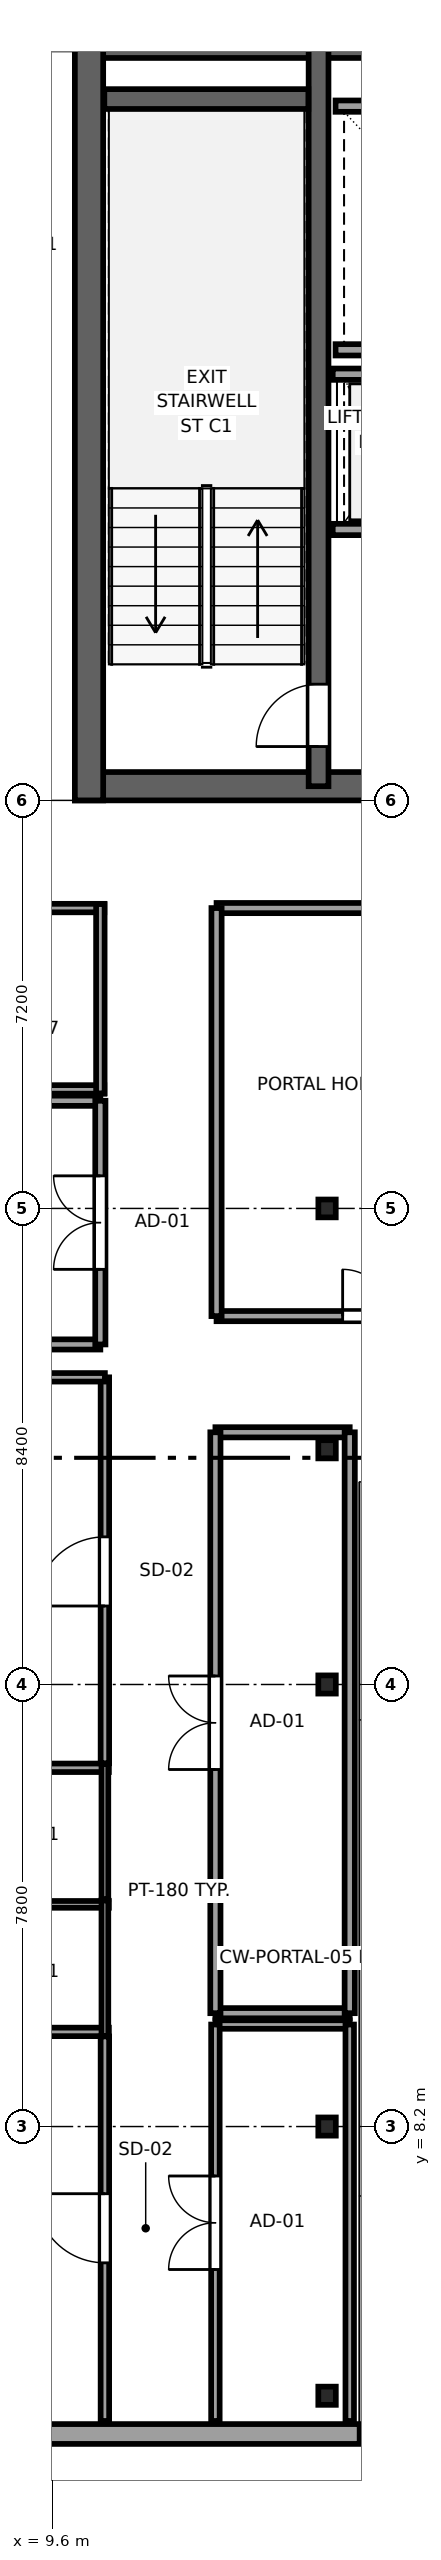
"""IFC4 building model, lengths in metres.
Left out: names, types, materials, properties, quantities, classifications, styles, units other than length and angle.
Written with IfcOpenShell. Run it as: python <this file> out.ifc"""

import sys

from ifc_helpers import new_model, si_unit, direction, frame, frame_2d, origin, origin_2d, place, context, subcontext, project, spatial, rectangle, i_section, extrude, source, transform, mapped, element, fill, save


model = new_model("IFC4")
c1 = context("Model", 3, precision=1e-05, world=origin(), true_north=direction((0.0, 1.0)))
c2 = subcontext(c1, "Body", "Model", "MODEL_VIEW")
j1 = project(units=[si_unit("LENGTHUNIT", "METRE"), si_unit("PLANEANGLEUNIT", "RADIAN")], contexts=[c1])
p1 = place(None, origin())
s1 = spatial("IfcSite", under=j1, at=p1, CompositionType="ELEMENT")
p2 = place(p1, origin())
s2 = spatial("IfcBuilding", under=s1, at=p2, CompositionType="ELEMENT")
p3 = place(p2, frame((0.0, 0.0, 252.3)))
s3 = spatial("IfcBuildingStorey", under=s2, at=p3, CompositionType="ELEMENT", Elevation=252.3)
p4 = place(p3, frame((10.0, 31.85, 0.0), z_axis=(0.0, 0.0, 1.0), x_axis=(1.0, 0.0, 0.0)))
e1 = element("IfcWall", 1, at=p4, inside=s3, PredefinedType="SHEAR", context=c2, shape_type="SweptSolid", body=[
    extrude(rectangle(XDim=26.0, YDim=0.5, at=frame_2d((13.0, 0.0))), origin(), (0.0, 0.0, 1.0), 3.55),
])
p5 = place(p4, frame((7.45, 0.0, 0.0), z_axis=(0.0, 0.0, 1.0), x_axis=(-1.0, 0.0, 0.0)))
e2 = element("IfcOpeningElement", 2, at=p5, cuts=e1, PredefinedType="OPENING", context=c2, shape_type="SweptSolid", body=[
    extrude(rectangle(XDim=1.5, YDim=2.04, at=frame_2d((0.75, 1.02))), frame((0.0, 0.26, 0.0), z_axis=(0.0, -1.0, 0.0), x_axis=(1.0, 0.0, 0.0)), (0.0, 0.0, 1.0), 0.52),
])
p6 = place(p4, frame((13.75, 0.0, 0.0), z_axis=(0.0, 0.0, 1.0), x_axis=(-1.0, 0.0, 0.0)))
e3 = element("IfcOpeningElement", 3, at=p6, cuts=e1, PredefinedType="OPENING", context=c2, shape_type="SweptSolid", body=[
    extrude(rectangle(XDim=1.5, YDim=2.04, at=frame_2d((0.75, 1.02))), frame((0.0, 0.26, 0.0), z_axis=(0.0, -1.0, 0.0), x_axis=(1.0, 0.0, 0.0)), (0.0, 0.0, 1.0), 0.52),
])
p7 = place(p4, frame((20.05, 0.0, 0.0), z_axis=(0.0, 0.0, 1.0), x_axis=(-1.0, 0.0, 0.0)))
e4 = element("IfcOpeningElement", 4, at=p7, cuts=e1, PredefinedType="OPENING", context=c2, shape_type="SweptSolid", body=[
    extrude(rectangle(XDim=1.5, YDim=2.04, at=frame_2d((0.75, 1.02))), frame((0.0, 0.26, 0.0), z_axis=(0.0, -1.0, 0.0), x_axis=(1.0, 0.0, 0.0)), (0.0, 0.0, 1.0), 0.52),
])
p8 = place(p3, frame((10.0, 44.95, 0.0), z_axis=(0.0, 0.0, 1.0), x_axis=(1.0, 0.0, 0.0)))
e5 = element("IfcWall", 5, at=p8, inside=s3, PredefinedType="SHEAR", context=c2, shape_type="SweptSolid", body=[
    extrude(rectangle(XDim=26.0, YDim=0.5, at=frame_2d((13.0, 0.0))), origin(), (0.0, 0.0, 1.0), 3.55),
])
p9 = place(p3, frame((10.25, 31.6, 0.0), z_axis=(0.0, 0.0, 1.0), x_axis=(0.0, 1.0, 0.0)))
e6 = element("IfcWall", 6, at=p9, inside=s3, PredefinedType="SHEAR", context=c2, shape_type="SweptSolid", body=[
    extrude(rectangle(XDim=13.6, YDim=0.5, at=frame_2d((6.8, 0.0))), origin(), (0.0, 0.0, 1.0), 3.55),
])
p10 = place(p3, frame((14.3, 31.85, 0.0), z_axis=(0.0, 0.0, 1.0), x_axis=(0.0, 1.0, 0.0)))
e7 = element("IfcWall", 7, at=p10, inside=s3, PredefinedType="SHEAR", context=c2, shape_type="SweptSolid", body=[
    extrude(rectangle(XDim=13.1, YDim=0.35, at=frame_2d((6.55, 0.0))), origin(), (0.0, 0.0, 1.0), 3.55),
])
p11 = place(p10, frame((0.7, 0.0, 0.0)))
e8 = element("IfcOpeningElement", 8, at=p11, cuts=e7, PredefinedType="OPENING", context=c2, shape_type="SweptSolid", body=[
    extrude(rectangle(XDim=1.1, YDim=2.12, at=frame_2d((0.55, 1.06))), frame((0.0, 0.185, 0.0), z_axis=(0.0, -1.0, 0.0), x_axis=(1.0, 0.0, 0.0)), (0.0, 0.0, 1.0), 0.37),
])
p12 = place(p3, frame((10.52, 43.975, 0.0), z_axis=(0.0, 0.0, 1.0), x_axis=(1.0, 0.0, 0.0)))
e9 = element("IfcWall", 9, at=p12, inside=s3, PredefinedType="SHEAR", context=c2, shape_type="SweptSolid", body=[
    extrude(rectangle(XDim=3.6, YDim=0.35, at=frame_2d((1.8, 0.0))), origin(), (0.0, 0.0, 1.0), 3.55),
])
m1 = source(origin(), c2, "Body", "SweptSolid", [
    extrude(i_section(OverallWidth=0.309, OverallDepth=0.321, WebThickness=0.014, FlangeThickness=0.022, FilletRadius=0.017, at=origin_2d()), origin(), (0.0, 0.0, 1.0), 3.55),
])
for number, where, z_axis, x_axis in (
    (10, (14.45, 3.45, 0.0), (0.0, 0.0, 1.0), (1.0, 0.0, 0.0)),
    (11, (14.45, 8.2, 0.0), (0.0, 0.0, 1.0), (1.0, 0.0, 0.0)),
    (12, (14.45, 16.0, 0.0), (0.0, 0.0, 1.0), (1.0, 0.0, 0.0)),
):
    element("IfcColumn", number, at=place(p3, frame(where, z_axis=z_axis, x_axis=x_axis)), inside=s3, PredefinedType="COLUMN", context=c2, shape_type="MappedRepresentation", body=[
        mapped(m1, transform((0.0, 0.0, 0.0), x_axis=(1.0, 0.0, 0.0), y_axis=(0.0, 1.0, 0.0), z_axis=(0.0, 0.0, 1.0), scale=1.0)),
    ])
m2 = source(origin(), c2, "Body", "SweptSolid", [
    extrude(i_section(OverallWidth=0.307, OverallDepth=0.315, WebThickness=0.012, FlangeThickness=0.019, FilletRadius=0.017, at=origin_2d()), origin(), (0.0, 0.0, 1.0), 3.55),
])
p13 = place(p3, frame((14.45, 24.4, 0.0), z_axis=(0.0, 0.0, 1.0), x_axis=(1.0, 0.0, 0.0)))
e13 = element("IfcColumn", 13, at=p13, inside=s3, PredefinedType="COLUMN", context=c2, shape_type="MappedRepresentation", body=[
    mapped(m2, transform((0.0, 0.0, 0.0), x_axis=(1.0, 0.0, 0.0), y_axis=(0.0, 1.0, 0.0), z_axis=(0.0, 0.0, 1.0), scale=1.0)),
])
p14 = place(p3, frame((14.45, 20.15, 0.0), z_axis=(0.0, 0.0, 1.0), x_axis=(1.0, 0.0, 0.0)))
e14 = element("IfcColumn", 14, at=p14, inside=s3, PredefinedType="COLUMN", context=c2, shape_type="MappedRepresentation", body=[
    mapped(m1, transform((0.0, 0.0, 0.0), x_axis=(1.0, 0.0, 0.0), y_axis=(0.0, 1.0, 0.0), z_axis=(0.0, 0.0, 1.0), scale=1.0)),
])
p15 = place(p3, frame((7.017, 2.775, 0.0), z_axis=(0.0, 0.0, 1.0), x_axis=(1.0, 0.0, 0.0)))
e15 = element("IfcWall", 15, at=p15, inside=s3, PredefinedType="SOLIDWALL", context=c2, shape_type="SweptSolid", body=[
    extrude(rectangle(XDim=8.008, YDim=0.35, at=frame_2d((4.004, 0.0))), origin(), (0.0, 0.0, 1.0), 3.37),
])
for number, where, z_axis, x_axis in (
    (16, (14.6, 39.55, 0.0), (0.0, 0.0, 1.0), (1.0, 0.0, 0.0)),
    (17, (14.6, 43.85, 0.0), (0.0, 0.0, 1.0), (1.0, 0.0, 0.0)),
):
    element("IfcWall", number, at=place(p3, frame(where, z_axis=z_axis, x_axis=x_axis)), inside=s3, PredefinedType="SOLIDWALL", context=c2, shape_type="SweptSolid", body=[
        extrude(rectangle(XDim=4.1, YDim=0.2, at=frame_2d((2.05, 0.0))), origin(), (0.0, 0.0, 1.0), 3.37),
    ])
p16 = place(p3, frame((14.55, 36.38, 0.0), z_axis=(0.0, 0.0, 1.0), x_axis=(1.0, 0.0, 0.0)))
e18 = element("IfcWall", 18, at=p16, inside=s3, PredefinedType="SOLIDWALL", context=c2, shape_type="SweptSolid", body=[
    extrude(rectangle(XDim=4.075, YDim=0.2, at=frame_2d((2.038, 0.0))), origin(), (0.0, 0.0, 1.0), 3.37),
])
p17 = place(p16, frame((0.55, 0.0, 0.0)))
e19 = element("IfcOpeningElement", 19, at=p17, cuts=e18, PredefinedType="OPENING", context=c2, shape_type="SweptSolid", body=[
    extrude(rectangle(XDim=1.1, YDim=2.12, at=frame_2d((0.55, 1.06))), frame((0.0, 0.11, 0.0), z_axis=(0.0, -1.0, 0.0), x_axis=(1.0, 0.0, 0.0)), (0.0, 0.0, 1.0), 0.22),
])
p18 = place(p16, frame((2.45, 0.0, 0.0)))
e20 = element("IfcOpeningElement", 20, at=p18, cuts=e18, PredefinedType="OPENING", context=c2, shape_type="SweptSolid", body=[
    extrude(rectangle(XDim=1.1, YDim=2.12, at=frame_2d((0.55, 1.06))), frame((0.0, 0.11, 0.0), z_axis=(0.0, -1.0, 0.0), x_axis=(1.0, 0.0, 0.0)), (0.0, 0.0, 1.0), 0.22),
])
p19 = place(p3, frame((14.55, 39.12, 0.0), z_axis=(0.0, 0.0, 1.0), x_axis=(1.0, 0.0, 0.0)))
e21 = element("IfcWall", 21, at=p19, inside=s3, PredefinedType="SOLIDWALL", context=c2, shape_type="SweptSolid", body=[
    extrude(rectangle(XDim=4.075, YDim=0.2, at=frame_2d((2.038, 0.0))), origin(), (0.0, 0.0, 1.0), 3.37),
])
p20 = place(p3, frame((8.01, 9.87, 0.0), z_axis=(0.0, 0.0, 1.0), x_axis=(1.0, 0.0, 0.0)))
e22 = element("IfcWall", 22, at=p20, inside=s3, PredefinedType="PARTITIONING", context=c2, shape_type="SweptSolid", body=[
    extrude(rectangle(XDim=2.59, YDim=0.15, at=frame_2d((1.295, 0.0))), origin(), (0.0, 0.0, 1.0), 3.37),
])
p21 = place(p3, frame((8.01, 12.12, 0.0), z_axis=(0.0, 0.0, 1.0), x_axis=(1.0, 0.0, 0.0)))
e23 = element("IfcWall", 23, at=p21, inside=s3, PredefinedType="PLUMBINGWALL", context=c2, shape_type="SweptSolid", body=[
    extrude(rectangle(XDim=2.59, YDim=0.12, at=frame_2d((1.295, 0.0))), origin(), (0.0, 0.0, 1.0), 3.37),
])
p22 = place(p3, frame((10.53, 9.8, 0.0), z_axis=(0.0, 0.0, 1.0), x_axis=(0.0, 1.0, 0.0)))
e24 = element("IfcWall", 24, at=p22, inside=s3, PredefinedType="PLUMBINGWALL", context=c2, shape_type="SweptSolid", body=[
    extrude(rectangle(XDim=2.39, YDim=0.12, at=frame_2d((1.195, 0.0))), origin(), (0.0, 0.0, 1.0), 3.37),
])
p23 = place(p3, frame((8.01, 14.53, 0.0), z_axis=(0.0, 0.0, 1.0), x_axis=(1.0, 0.0, 0.0)))
e25 = element("IfcWall", 25, at=p23, inside=s3, PredefinedType="PARTITIONING", context=c2, shape_type="SweptSolid", body=[
    extrude(rectangle(XDim=2.59, YDim=0.15, at=frame_2d((1.295, 0.0))), origin(), (0.0, 0.0, 1.0), 3.37),
])
p24 = place(p3, frame((10.53, 12.21, 0.0), z_axis=(0.0, 0.0, 1.0), x_axis=(0.0, 1.0, 0.0)))
e26 = element("IfcWall", 26, at=p24, inside=s3, PredefinedType="PLUMBINGWALL", context=c2, shape_type="SweptSolid", body=[
    extrude(rectangle(XDim=2.39, YDim=0.12, at=frame_2d((1.195, 0.0))), origin(), (0.0, 0.0, 1.0), 3.37),
])
p25 = place(p3, frame((10.53, 3.005, 0.0), z_axis=(0.0, 0.0, 1.0), x_axis=(0.0, 1.0, 0.0)))
e27 = element("IfcWall", 27, at=p25, inside=s3, PredefinedType="PARTITIONING", context=c2, shape_type="SweptSolid", body=[
    extrude(rectangle(XDim=6.785, YDim=0.15, at=frame_2d((3.393, 0.0))), origin(), (0.0, 0.0, 1.0), 3.37),
])
p26 = place(p25, frame((2.79, 0.0, 0.0)))
e28 = element("IfcOpeningElement", 28, at=p26, cuts=e27, PredefinedType="OPENING", context=c2, shape_type="SweptSolid", body=[
    extrude(rectangle(XDim=1.22, YDim=2.08, at=frame_2d((0.61, 1.04))), frame((0.0, 0.085, 0.0), z_axis=(0.0, -1.0, 0.0), x_axis=(1.0, 0.0, 0.0)), (0.0, 0.0, 1.0), 0.17),
])
p27 = place(p3, frame((10.53, 14.61, 0.0), z_axis=(0.0, 0.0, 1.0), x_axis=(0.0, 1.0, 0.0)))
e29 = element("IfcWall", 29, at=p27, inside=s3, PredefinedType="PARTITIONING", context=c2, shape_type="SweptSolid", body=[
    extrude(rectangle(XDim=6.81, YDim=0.15, at=frame_2d((3.405, 0.0))), origin(), (0.0, 0.0, 1.0), 3.37),
])
p28 = place(p27, frame((2.775, 0.0, 0.0)))
e30 = element("IfcOpeningElement", 30, at=p28, cuts=e29, PredefinedType="OPENING", context=c2, shape_type="SweptSolid", body=[
    extrude(rectangle(XDim=1.22, YDim=2.08, at=frame_2d((0.61, 1.04))), frame((0.0, 0.085, 0.0), z_axis=(0.0, -1.0, 0.0), x_axis=(1.0, 0.0, 0.0)), (0.0, 0.0, 1.0), 0.17),
])
p29 = place(p3, frame((3.005, 21.42, 0.0), z_axis=(0.0, 0.0, 1.0), x_axis=(1.0, 0.0, 0.0)))
e31 = element("IfcWall", 31, at=p29, inside=s3, PredefinedType="PARTITIONING", context=c2, shape_type="SweptSolid", body=[
    extrude(rectangle(XDim=7.525, YDim=0.15, at=frame_2d((3.763, 0.0))), origin(), (0.0, 0.0, 1.0), 3.37),
])
for number, where, z_axis, x_axis in (
    (32, (12.48, 10.2, 0.0), (0.0, 0.0, 1.0), (1.0, 0.0, 0.0)),
    (33, (12.48, 20.45, 0.0), (0.0, 0.0, 1.0), (1.0, 0.0, 0.0)),
):
    element("IfcWall", number, at=place(p3, frame(where, z_axis=z_axis, x_axis=x_axis)), inside=s3, PredefinedType="PARTITIONING", context=c2, shape_type="SweptSolid", body=[
        extrude(rectangle(XDim=2.37, YDim=0.18, at=frame_2d((1.185, 0.0))), origin(), (0.0, 0.0, 1.0), 3.37),
    ])
p30 = place(p3, frame((12.48, 10.2, 0.0), z_axis=(0.0, 0.0, 1.0), x_axis=(0.0, 1.0, 0.0)))
e34 = element("IfcWall", 34, at=p30, inside=s3, PredefinedType="PARTITIONING", context=c2, shape_type="SweptSolid", body=[
    extrude(rectangle(XDim=10.25, YDim=0.18, at=frame_2d((5.125, 0.0))), origin(), (0.0, 0.0, 1.0), 3.37),
])
p31 = place(p30, frame((4.3, 0.0, 0.0)))
e35 = element("IfcOpeningElement", 35, at=p31, cuts=e34, PredefinedType="OPENING", context=c2, shape_type="SweptSolid", body=[
    extrude(rectangle(XDim=1.65, YDim=2.15, at=frame_2d((0.825, 1.075))), frame((0.0, 0.1, 0.0), z_axis=(0.0, -1.0, 0.0), x_axis=(1.0, 0.0, 0.0)), (0.0, 0.0, 1.0), 0.2),
])
p32 = place(p3, frame((14.85, 10.2, 0.0), z_axis=(0.0, 0.0, 1.0), x_axis=(0.0, 1.0, 0.0)))
e36 = element("IfcWall", 36, at=p32, inside=s3, PredefinedType="PARTITIONING", context=c2, shape_type="SweptSolid", body=[
    extrude(rectangle(XDim=10.25, YDim=0.18, at=frame_2d((5.125, 0.0))), origin(), (0.0, 0.0, 1.0), 3.37),
])
p33 = place(p3, frame((12.48, 10.0, 0.0), z_axis=(0.0, 0.0, 1.0), x_axis=(1.0, 0.0, 0.0)))
e37 = element("IfcWall", 37, at=p33, inside=s3, PredefinedType="PARTITIONING", context=c2, shape_type="SweptSolid", body=[
    extrude(rectangle(XDim=2.37, YDim=0.15, at=frame_2d((1.185, 0.0))), origin(), (0.0, 0.0, 1.0), 3.37),
])
p34 = place(p3, frame((12.48, 3.005, 0.0), z_axis=(0.0, 0.0, 1.0), x_axis=(0.0, 1.0, 0.0)))
e38 = element("IfcWall", 38, at=p34, inside=s3, PredefinedType="PARTITIONING", context=c2, shape_type="SweptSolid", body=[
    extrude(rectangle(XDim=6.995, YDim=0.15, at=frame_2d((3.498, 0.0))), origin(), (0.0, 0.0, 1.0), 3.37),
])
p35 = place(p34, frame((2.673, 0.0, 0.0)))
e39 = element("IfcOpeningElement", 39, at=p35, cuts=e38, PredefinedType="OPENING", context=c2, shape_type="SweptSolid", body=[
    extrude(rectangle(XDim=1.65, YDim=2.15, at=frame_2d((0.825, 1.075))), frame((0.0, 0.085, 0.0), z_axis=(0.0, -1.0, 0.0), x_axis=(1.0, 0.0, 0.0)), (0.0, 0.0, 1.0), 0.17),
])
p36 = place(p3, frame((14.85, 3.005, 0.0), z_axis=(0.0, 0.0, 1.0), x_axis=(0.0, 1.0, 0.0)))
e40 = element("IfcWall", 40, at=p36, inside=s3, PredefinedType="PARTITIONING", context=c2, shape_type="SweptSolid", body=[
    extrude(rectangle(XDim=6.995, YDim=0.15, at=frame_2d((3.498, 0.0))), origin(), (0.0, 0.0, 1.0), 3.37),
])
p37 = place(p3, frame((12.5, 22.5, 0.0), z_axis=(0.0, 0.0, 1.0), x_axis=(1.0, 0.0, 0.0)))
e41 = element("IfcWall", 41, at=p37, inside=s3, PredefinedType="PARTITIONING", context=c2, shape_type="SweptSolid", body=[
    extrude(rectangle(XDim=6.1, YDim=0.18, at=frame_2d((3.05, 0.0))), origin(), (0.0, 0.0, 1.0), 3.37),
])
p38 = place(p37, frame((2.225, 0.0, 0.0)))
e42 = element("IfcOpeningElement", 42, at=p38, cuts=e41, PredefinedType="OPENING", context=c2, shape_type="SweptSolid", body=[
    extrude(rectangle(XDim=1.65, YDim=2.15, at=frame_2d((0.825, 1.075))), frame((0.0, 0.1, 0.0), z_axis=(0.0, -1.0, 0.0), x_axis=(1.0, 0.0, 0.0)), (0.0, 0.0, 1.0), 0.2),
])
p39 = place(p3, frame((12.5, 29.7, 0.0), z_axis=(0.0, 0.0, 1.0), x_axis=(1.0, 0.0, 0.0)))
e43 = element("IfcWall", 43, at=p39, inside=s3, PredefinedType="PARTITIONING", context=c2, shape_type="SweptSolid", body=[
    extrude(rectangle(XDim=6.1, YDim=0.18, at=frame_2d((3.05, 0.0))), origin(), (0.0, 0.0, 1.0), 3.37),
])
p40 = place(p3, frame((12.5, 22.5, 0.0), z_axis=(0.0, 0.0, 1.0), x_axis=(0.0, 1.0, 0.0)))
e44 = element("IfcWall", 44, at=p40, inside=s3, PredefinedType="PARTITIONING", context=c2, shape_type="SweptSolid", body=[
    extrude(rectangle(XDim=7.2, YDim=0.18, at=frame_2d((3.6, 0.0))), origin(), (0.0, 0.0, 1.0), 3.37),
])
for number, where, z_axis, x_axis in (
    (45, (3.005, 22.0, 0.0), (0.0, 0.0, 1.0), (1.0, 0.0, 0.0)),
    (46, (3.005, 26.3, 0.0), (0.0, 0.0, 1.0), (1.0, 0.0, 0.0)),
):
    element("IfcWall", number, at=place(p3, frame(where, z_axis=z_axis, x_axis=x_axis)), inside=s3, PredefinedType="PARTITIONING", context=c2, shape_type="SweptSolid", body=[
        extrude(rectangle(XDim=7.445, YDim=0.18, at=frame_2d((3.723, 0.0))), origin(), (0.0, 0.0, 1.0), 3.37),
    ])
p41 = place(p3, frame((10.45, 22.0, 0.0), z_axis=(0.0, 0.0, 1.0), x_axis=(0.0, 1.0, 0.0)))
e47 = element("IfcWall", 47, at=p41, inside=s3, PredefinedType="PARTITIONING", context=c2, shape_type="SweptSolid", body=[
    extrude(rectangle(XDim=4.3, YDim=0.18, at=frame_2d((2.15, 0.0))), origin(), (0.0, 0.0, 1.0), 3.37),
])
p42 = place(p41, frame((1.325, 0.0, 0.0)))
e48 = element("IfcOpeningElement", 48, at=p42, cuts=e47, PredefinedType="OPENING", context=c2, shape_type="SweptSolid", body=[
    extrude(rectangle(XDim=1.65, YDim=2.15, at=frame_2d((0.825, 1.075))), frame((0.0, 0.1, 0.0), z_axis=(0.0, -1.0, 0.0), x_axis=(1.0, 0.0, 0.0)), (0.0, 0.0, 1.0), 0.2),
])
p43 = place(p3, frame((6.13, 26.5, 0.0), z_axis=(0.0, 0.0, 1.0), x_axis=(1.0, 0.0, 0.0)))
e49 = element("IfcWall", 49, at=p43, inside=s3, PredefinedType="PARTITIONING", context=c2, shape_type="SweptSolid", body=[
    extrude(rectangle(XDim=4.39, YDim=0.15, at=frame_2d((2.195, 0.0))), origin(), (0.0, 0.0, 1.0), 3.37),
])
p44 = place(p3, frame((6.13, 29.7, 0.0), z_axis=(0.0, 0.0, 1.0), x_axis=(1.0, 0.0, 0.0)))
e50 = element("IfcWall", 50, at=p44, inside=s3, PredefinedType="PARTITIONING", context=c2, shape_type="SweptSolid", body=[
    extrude(rectangle(XDim=4.39, YDim=0.15, at=frame_2d((2.195, 0.0))), origin(), (0.0, 0.0, 1.0), 3.37),
])
p45 = place(p44, frame((1.735, 0.0, 0.0)))
e51 = element("IfcOpeningElement", 51, at=p45, cuts=e50, PredefinedType="OPENING", context=c2, shape_type="SweptSolid", body=[
    extrude(rectangle(XDim=0.92, YDim=2.01, at=frame_2d((0.46, 1.005))), frame((0.0, 0.085, 0.0), z_axis=(0.0, -1.0, 0.0), x_axis=(1.0, 0.0, 0.0)), (0.0, 0.0, 1.0), 0.17),
])
p46 = place(p3, frame((10.45, 26.43, 0.0), z_axis=(0.0, 0.0, 1.0), x_axis=(0.0, 1.0, 0.0)))
e52 = element("IfcWall", 52, at=p46, inside=s3, PredefinedType="PARTITIONING", context=c2, shape_type="SweptSolid", body=[
    extrude(rectangle(XDim=3.34, YDim=0.15, at=frame_2d((1.67, 0.0))), origin(), (0.0, 0.0, 1.0), 3.37),
])
m3 = source(origin(), c2, "Body", "SweptSolid", [
    extrude(rectangle(XDim=1.1, YDim=2.12, at=frame_2d((0.55, 1.06))), frame((0.0, 0.025, 0.0), z_axis=(0.0, -1.0, 0.0), x_axis=(1.0, 0.0, 0.0)), (0.0, 0.0, 1.0), 0.05),
])
p47 = place(p11, origin())
e53 = element("IfcDoor", 53, at=p47, inside=s3, OperationType="SINGLE_SWING_LEFT", PredefinedType="DOOR", context=c2, shape_type="MappedRepresentation", body=[
    mapped(m3, transform((0.0, 0.0, 0.0), x_axis=(1.0, 0.0, 0.0), y_axis=(0.0, 1.0, 0.0), z_axis=(0.0, 0.0, 1.0), scale=1.0)),
])
fill(e8, e53)
m4 = source(origin(), c2, "Body", "SweptSolid", [
    extrude(rectangle(XDim=1.22, YDim=2.08, at=frame_2d((0.61, 1.04))), frame((0.0, 0.025, 0.0), z_axis=(0.0, -1.0, 0.0), x_axis=(1.0, 0.0, 0.0)), (0.0, 0.0, 1.0), 0.05),
])
p48 = place(p26, origin())
e54 = element("IfcDoor", 54, at=p48, inside=s3, OperationType="SINGLE_SWING_RIGHT", PredefinedType="DOOR", context=c2, shape_type="MappedRepresentation", body=[
    mapped(m4, transform((0.0, 0.0, 0.0), x_axis=(1.0, 0.0, 0.0), y_axis=(0.0, 1.0, 0.0), z_axis=(0.0, 0.0, 1.0), scale=1.0)),
])
fill(e28, e54)
p49 = place(p28, origin())
e55 = element("IfcDoor", 55, at=p49, inside=s3, OperationType="SINGLE_SWING_LEFT", PredefinedType="DOOR", context=c2, shape_type="MappedRepresentation", body=[
    mapped(m4, transform((0.0, 0.0, 0.0), x_axis=(1.0, 0.0, 0.0), y_axis=(0.0, 1.0, 0.0), z_axis=(0.0, 0.0, 1.0), scale=1.0)),
])
fill(e30, e55)
m5 = source(origin(), c2, "Body", "SweptSolid", [
    extrude(rectangle(XDim=1.65, YDim=2.15, at=frame_2d((0.825, 1.075))), frame((0.0, 0.025, 0.0), z_axis=(0.0, -1.0, 0.0), x_axis=(1.0, 0.0, 0.0)), (0.0, 0.0, 1.0), 0.05),
])
p50 = place(p31, origin())
e56 = element("IfcDoor", 56, at=p50, inside=s3, OperationType="DOUBLE_DOOR_SINGLE_SWING", PredefinedType="DOOR", context=c2, shape_type="MappedRepresentation", body=[
    mapped(m5, transform((0.0, 0.0, 0.0), x_axis=(1.0, 0.0, 0.0), y_axis=(0.0, 1.0, 0.0), z_axis=(0.0, 0.0, 1.0), scale=1.0)),
])
fill(e35, e56)
p51 = place(p35, origin())
e57 = element("IfcDoor", 57, at=p51, inside=s3, OperationType="DOUBLE_DOOR_SINGLE_SWING", PredefinedType="DOOR", context=c2, shape_type="MappedRepresentation", body=[
    mapped(m5, transform((0.0, 0.0, 0.0), x_axis=(1.0, 0.0, 0.0), y_axis=(0.0, 1.0, 0.0), z_axis=(0.0, 0.0, 1.0), scale=1.0)),
])
fill(e39, e57)
p52 = place(p38, origin())
e58 = element("IfcDoor", 58, at=p52, inside=s3, OperationType="DOUBLE_DOOR_SINGLE_SWING", PredefinedType="DOOR", context=c2, shape_type="MappedRepresentation", body=[
    mapped(m5, transform((0.0, 0.0, 0.0), x_axis=(1.0, 0.0, 0.0), y_axis=(0.0, 1.0, 0.0), z_axis=(0.0, 0.0, 1.0), scale=1.0)),
])
fill(e42, e58)
p53 = place(p42, origin())
e59 = element("IfcDoor", 59, at=p53, inside=s3, OperationType="DOUBLE_DOOR_SINGLE_SWING", PredefinedType="DOOR", context=c2, shape_type="MappedRepresentation", body=[
    mapped(m5, transform((0.0, 0.0, 0.0), x_axis=(1.0, 0.0, 0.0), y_axis=(0.0, 1.0, 0.0), z_axis=(0.0, 0.0, 1.0), scale=1.0)),
])
fill(e48, e59)
save(model, sys.argv[1])
